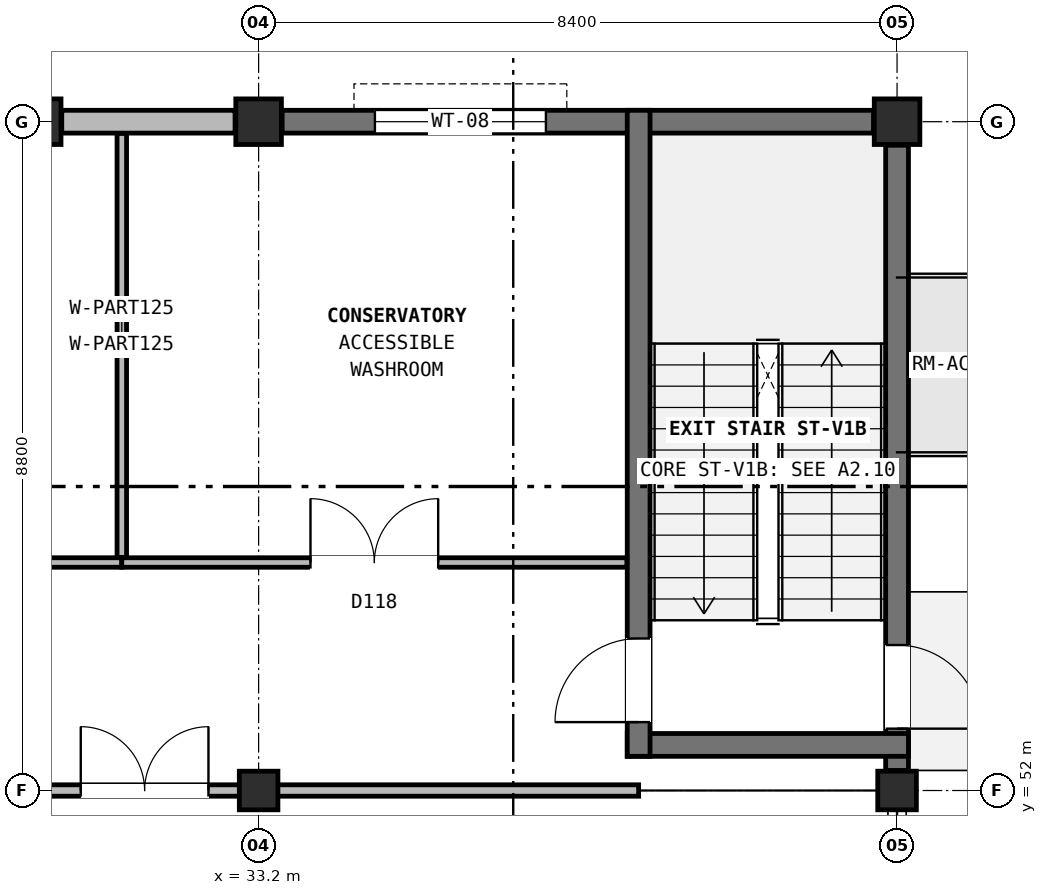
"""IFC4 building model, lengths in metres.
Left out: names, types, materials, properties, quantities, classifications, styles, units other than length and angle.
Written with IfcOpenShell. Run it as: python <this file> out.ifc"""

import sys

from ifc_helpers import new_model, si_unit, direction, frame, frame_2d, origin, origin_2d, place, context, subcontext, project, spatial, rectangle, hollow_circle, extrude, element, fill, save


model = new_model("IFC4")
c1 = context("Model", 3, precision=1e-05, world=origin(), true_north=direction((0.0, 1.0)))
c2 = subcontext(c1, "Body", "Model", "MODEL_VIEW")
j1 = project(units=[si_unit("LENGTHUNIT", "METRE"), si_unit("PLANEANGLEUNIT", "RADIAN")], contexts=[c1])
p1 = place(None, origin())
s1 = spatial("IfcSite", under=j1, at=p1, CompositionType="ELEMENT")
p2 = place(p1, origin())
s2 = spatial("IfcBuilding", under=s1, at=p2, CompositionType="ELEMENT")
p3 = place(p2, origin())
s3 = spatial("IfcBuildingStorey", under=s2, at=p3, CompositionType="ELEMENT", Elevation=0.0)
for number, where, z_axis, x_axis in (
    (1, (33.2, 52.0, 0.0), (0.0, 0.0, 1.0), (1.0, 0.0, 0.0)),
    (2, (41.6, 52.0, 0.0), (0.0, 0.0, 1.0), (1.0, 0.0, 0.0)),
):
    element("IfcColumn", number, at=place(p3, frame(where, z_axis=z_axis, x_axis=x_axis)), inside=s3, PredefinedType="COLUMN", context=c2, shape_type="SweptSolid", body=[
        extrude(hollow_circle(Radius=0.254, WallThickness=0.016, at=origin_2d()), origin(), (0.0, 0.0, 1.0), 4.8),
    ])
for number, where, z_axis, x_axis in (
    (3, (33.2, 60.8, 0.0), (0.0, 0.0, 1.0), (1.0, 0.0, 0.0)),
    (4, (41.6, 60.8, 0.0), (0.0, 0.0, 1.0), (1.0, 0.0, 0.0)),
    (5, (30.3, 60.8, 0.0), (0.0, 0.0, 1.0), (1.0, 0.0, 0.0)),
):
    element("IfcColumn", number, at=place(p3, frame(where, z_axis=z_axis, x_axis=x_axis)), inside=s3, PredefinedType="COLUMN", context=c2, shape_type="SweptSolid", body=[
        extrude(rectangle(XDim=0.6, YDim=0.6, at=origin_2d()), origin(), (0.0, 0.0, 1.0), 4.8),
    ])
p4 = place(p3, frame((41.6, 52.264, 0.0), z_axis=(0.0, 0.0, 1.0), x_axis=(0.0, 1.0, 0.0)))
e6 = element("IfcWall", 6, at=p4, inside=s3, PredefinedType="SHEAR", context=c2, shape_type="SweptSolid", body=[
    extrude(rectangle(XDim=8.226, YDim=0.3, at=frame_2d((4.113, 0.0))), origin(), (0.0, 0.0, 1.0), 4.15),
])
p5 = place(p4, frame((0.55, 0.0, 0.0)))
e7 = element("IfcOpeningElement", 7, at=p5, cuts=e6, PredefinedType="OPENING", context=c2, shape_type="SweptSolid", body=[
    extrude(rectangle(XDim=1.1, YDim=2.2, at=frame_2d((0.55, 1.1))), frame((0.0, 0.16, 0.0), z_axis=(0.0, -1.0, 0.0), x_axis=(1.0, 0.0, 0.0)), (0.0, 0.0, 1.0), 0.32),
])
p6 = place(p3, frame((41.29, 60.8, 0.0), z_axis=(0.0, 0.0, 1.0), x_axis=(-1.0, 0.0, 0.0)))
e8 = element("IfcWall", 8, at=p6, inside=s3, PredefinedType="SHEAR", context=c2, shape_type="SweptSolid", body=[
    extrude(rectangle(XDim=7.78, YDim=0.3, at=frame_2d((3.89, 0.0))), origin(), (0.0, 0.0, 1.0), 4.15),
])
p7 = place(p6, frame((4.31, 0.0, 0.9)))
e9 = element("IfcOpeningElement", 9, at=p7, cuts=e8, PredefinedType="OPENING", context=c2, shape_type="SweptSolid", body=[
    extrude(rectangle(XDim=2.25, YDim=1.95, at=frame_2d((1.125, 0.975))), frame((0.0, 0.16, 0.0), z_axis=(0.0, -1.0, 0.0), x_axis=(1.0, 0.0, 0.0)), (0.0, 0.0, 1.0), 0.32),
])
p8 = place(p3, frame((32.89, 60.8, 0.0), z_axis=(0.0, 0.0, 1.0), x_axis=(-1.0, 0.0, 0.0)))
e10 = element("IfcWall", 10, at=p8, inside=s3, PredefinedType="SOLIDWALL", context=c2, shape_type="SweptSolid", body=[
    extrude(rectangle(XDim=2.28, YDim=0.3, at=frame_2d((1.14, 0.0))), origin(), (0.0, 0.0, 1.0), 4.15),
])
p9 = place(p3, frame((38.05, 52.6, 0.0), z_axis=(0.0, 0.0, 1.0), x_axis=(1.0, 0.0, 0.0)))
e11 = element("IfcWall", 11, at=p9, inside=s3, PredefinedType="SHEAR", context=c2, shape_type="SweptSolid", body=[
    extrude(rectangle(XDim=3.7, YDim=0.3, at=frame_2d((1.85, 0.0))), origin(), (0.0, 0.0, 1.0), 4.8),
])
p10 = place(p3, frame((38.2, 52.45, 0.0), z_axis=(0.0, 0.0, 1.0), x_axis=(0.0, 1.0, 0.0)))
e12 = element("IfcWall", 12, at=p10, inside=s3, PredefinedType="SHEAR", context=c2, shape_type="SweptSolid", body=[
    extrude(rectangle(XDim=8.5, YDim=0.3, at=frame_2d((4.25, 0.0))), origin(), (0.0, 0.0, 1.0), 4.8),
])
p11 = place(p10, frame((0.45, 0.0, 0.0)))
e13 = element("IfcOpeningElement", 13, at=p11, cuts=e12, PredefinedType="OPENING", context=c2, shape_type="SweptSolid", body=[
    extrude(rectangle(XDim=1.1, YDim=2.2, at=frame_2d((0.55, 1.1))), frame((0.0, 0.16, 0.0), z_axis=(0.0, -1.0, 0.0), x_axis=(1.0, 0.0, 0.0)), (0.0, 0.0, 1.0), 0.32),
])
p12 = place(p3, frame((28.0, 52.0, 0.0), z_axis=(0.0, 0.0, 1.0), x_axis=(1.0, 0.0, 0.0)))
e14 = element("IfcWall", 14, at=p12, inside=s3, PredefinedType="PARTITIONING", context=c2, shape_type="SweptSolid", body=[
    extrude(rectangle(XDim=10.2, YDim=0.15, at=frame_2d((5.1, 0.0))), origin(), (0.0, 0.0, 1.0), 4.145),
])
p13 = place(p12, frame((2.86, 0.0, 0.0)))
e15 = element("IfcOpeningElement", 15, at=p13, cuts=e14, PredefinedType="OPENING", context=c2, shape_type="SweptSolid", body=[
    extrude(rectangle(XDim=1.68, YDim=2.3, at=frame_2d((0.84, 1.15))), frame((0.0, 0.085, 0.0), z_axis=(0.0, -1.0, 0.0), x_axis=(1.0, 0.0, 0.0)), (0.0, 0.0, 1.0), 0.17),
])
p14 = place(p3, frame((24.6, 55.0, 0.0), z_axis=(0.0, 0.0, 1.0), x_axis=(1.0, 0.0, 0.0)))
e16 = element("IfcWall", 16, at=p14, inside=s3, PredefinedType="PARTITIONING", context=c2, shape_type="SweptSolid", body=[
    extrude(rectangle(XDim=6.8, YDim=0.125, at=frame_2d((3.4, 0.0))), origin(), (0.0, 0.0, 1.0), 4.465),
])
p15 = place(p14, frame((2.56, 0.0, 0.0)))
e17 = element("IfcOpeningElement", 17, at=p15, cuts=e16, PredefinedType="OPENING", context=c2, shape_type="SweptSolid", body=[
    extrude(rectangle(XDim=1.68, YDim=2.3, at=frame_2d((0.84, 1.15))), frame((0.0, 0.073, 0.0), z_axis=(0.0, -1.0, 0.0), x_axis=(1.0, 0.0, 0.0)), (0.0, 0.0, 1.0), 0.145),
])
p16 = place(p3, frame((31.4, 55.0, 0.0), z_axis=(0.0, 0.0, 1.0), x_axis=(1.0, 0.0, 0.0)))
e18 = element("IfcWall", 18, at=p16, inside=s3, PredefinedType="PARTITIONING", context=c2, shape_type="SweptSolid", body=[
    extrude(rectangle(XDim=6.645, YDim=0.125, at=frame_2d((3.323, 0.0))), origin(), (0.0, 0.0, 1.0), 4.465),
])
p17 = place(p16, frame((2.482, 0.0, 0.0)))
e19 = element("IfcOpeningElement", 19, at=p17, cuts=e18, PredefinedType="OPENING", context=c2, shape_type="SweptSolid", body=[
    extrude(rectangle(XDim=1.68, YDim=2.3, at=frame_2d((0.84, 1.15))), frame((0.0, 0.073, 0.0), z_axis=(0.0, -1.0, 0.0), x_axis=(1.0, 0.0, 0.0)), (0.0, 0.0, 1.0), 0.145),
])
p18 = place(p3, frame((31.4, 55.067, 0.0), z_axis=(0.0, 0.0, 1.0), x_axis=(0.0, 1.0, 0.0)))
e20 = element("IfcWall", 20, at=p18, inside=s3, PredefinedType="PARTITIONING", context=c2, shape_type="SweptSolid", body=[
    extrude(rectangle(XDim=5.578, YDim=0.125, at=frame_2d((2.789, 0.0))), origin(), (0.0, 0.0, 1.0), 4.465),
])
p19 = place(p5, frame((1.1, 0.0, 0.0), z_axis=(0.0, 0.0, 1.0), x_axis=(-1.0, 0.0, 0.0)))
e21 = element("IfcDoor", 21, at=p19, inside=s3, OperationType="SINGLE_SWING_LEFT", PredefinedType="DOOR", context=c2, shape_type="SweptSolid", body=[
    extrude(rectangle(XDim=1.1, YDim=2.2, at=frame_2d((0.55, 1.1))), frame((0.0, 0.025, 0.0), z_axis=(0.0, -1.0, 0.0), x_axis=(1.0, 0.0, 0.0)), (0.0, 0.0, 1.0), 0.05),
])
fill(e7, e21)
p20 = place(p7, origin())
e22 = element("IfcWindow", 22, at=p20, inside=s3, PartitioningType="SINGLE_PANEL", PredefinedType="WINDOW", context=c2, shape_type="SweptSolid", body=[
    extrude(rectangle(XDim=2.25, YDim=1.95, at=frame_2d((1.125, 0.975))), frame((0.0, 0.03, 0.0), z_axis=(0.0, -1.0, 0.0), x_axis=(1.0, 0.0, 0.0)), (0.0, 0.0, 1.0), 0.06),
])
fill(e9, e22)
p21 = place(p11, origin())
e23 = element("IfcDoor", 23, at=p21, inside=s3, OperationType="SINGLE_SWING_LEFT", PredefinedType="DOOR", context=c2, shape_type="SweptSolid", body=[
    extrude(rectangle(XDim=1.1, YDim=2.2, at=frame_2d((0.55, 1.1))), frame((0.0, 0.025, 0.0), z_axis=(0.0, -1.0, 0.0), x_axis=(1.0, 0.0, 0.0)), (0.0, 0.0, 1.0), 0.05),
])
fill(e13, e23)
p22 = place(p13, origin())
e24 = element("IfcDoor", 24, at=p22, inside=s3, OperationType="DOUBLE_DOOR_SINGLE_SWING", PredefinedType="DOOR", context=c2, shape_type="SweptSolid", body=[
    extrude(rectangle(XDim=1.68, YDim=2.3, at=frame_2d((0.84, 1.15))), frame((0.0, 0.025, 0.0), z_axis=(0.0, -1.0, 0.0), x_axis=(1.0, 0.0, 0.0)), (0.0, 0.0, 1.0), 0.05),
])
fill(e15, e24)
p23 = place(p17, origin())
e25 = element("IfcDoor", 25, at=p23, inside=s3, OperationType="DOUBLE_DOOR_SINGLE_SWING", PredefinedType="DOOR", context=c2, shape_type="SweptSolid", body=[
    extrude(rectangle(XDim=1.68, YDim=2.3, at=frame_2d((0.84, 1.15))), frame((0.0, 0.025, 0.0), z_axis=(0.0, -1.0, 0.0), x_axis=(1.0, 0.0, 0.0)), (0.0, 0.0, 1.0), 0.05),
])
fill(e19, e25)
save(model, sys.argv[1])
